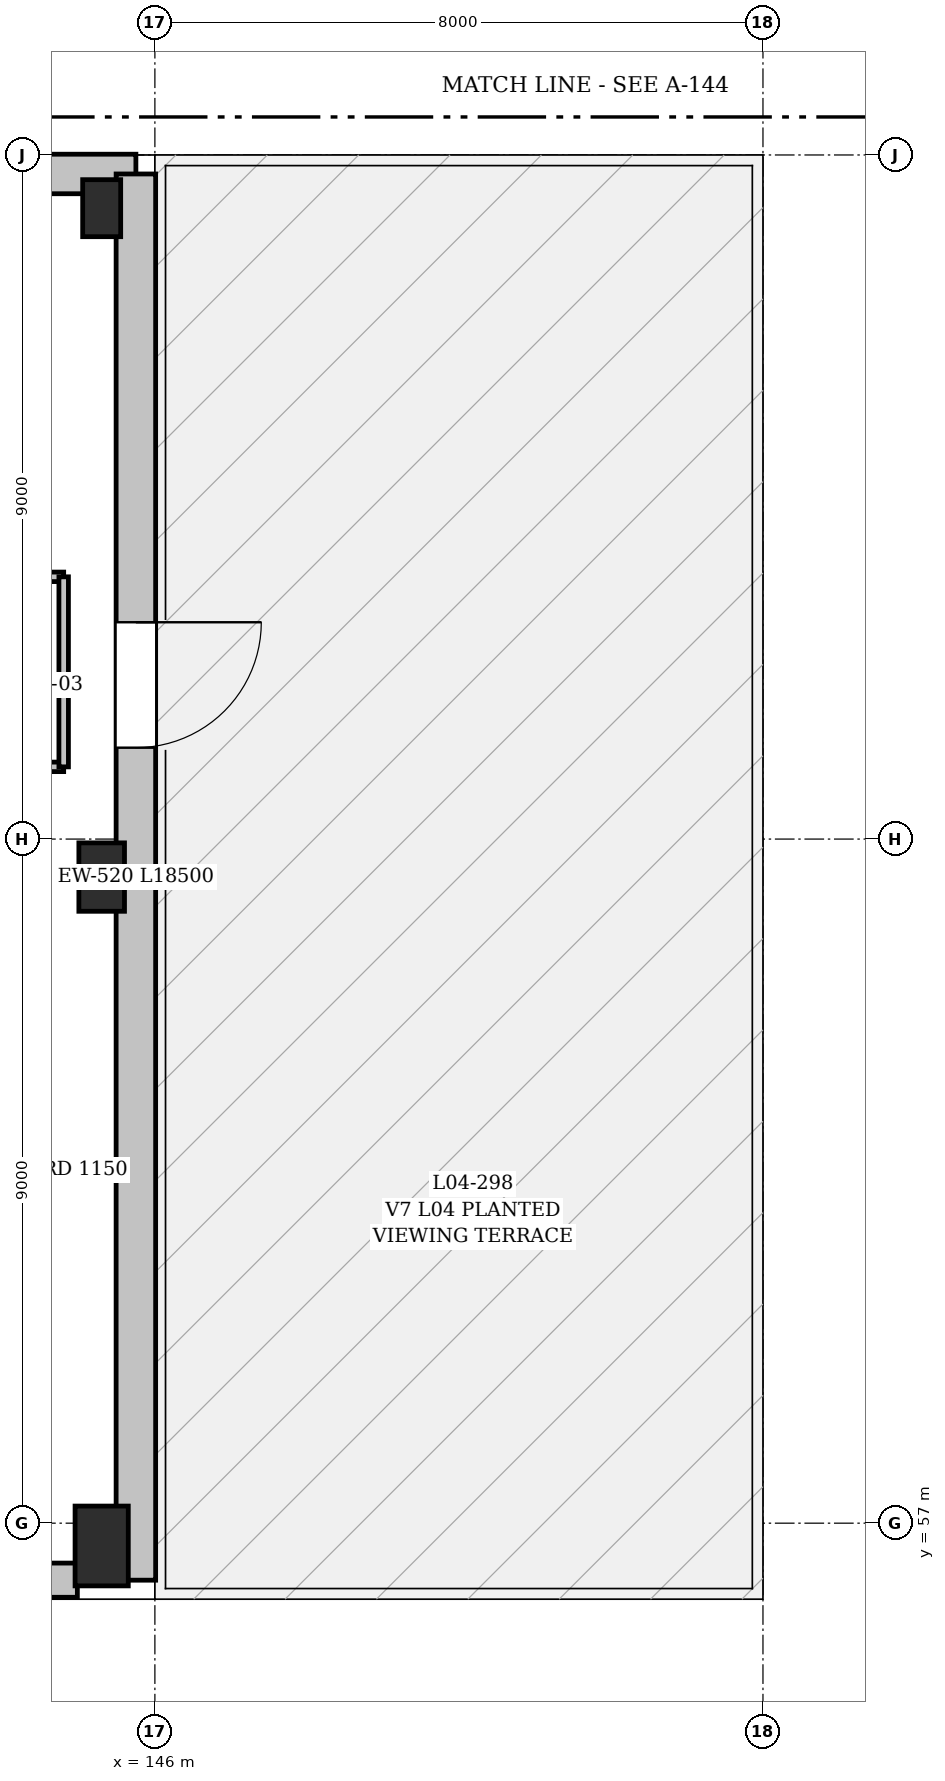
"""IFC4 building model, lengths in metres.
Left out: names, types, materials, properties, quantities, classifications, styles, units other than length and angle.
Written with IfcOpenShell. Run it as: python <this file> out.ifc"""

import sys

from ifc_helpers import new_model, si_unit, direction, frame, frame_2d, origin, origin_2d, place, context, subcontext, project, spatial, rectangle, extrude, element, fill, save


model = new_model("IFC4")
c1 = context("Model", 3, precision=1e-05, world=origin(), true_north=direction((0.0, 1.0)))
c2 = subcontext(c1, "Body", "Model", "MODEL_VIEW")
j1 = project(units=[si_unit("LENGTHUNIT", "METRE"), si_unit("PLANEANGLEUNIT", "RADIAN")], contexts=[c1])
p1 = place(None, origin())
s1 = spatial("IfcSite", under=j1, at=p1, CompositionType="ELEMENT")
p2 = place(p1, origin())
s2 = spatial("IfcBuilding", under=s1, at=p2, CompositionType="ELEMENT")
p3 = place(p2, frame((0.0, 0.0, 15.0)))
s3 = spatial("IfcBuildingStorey", under=s2, at=p3, CompositionType="ELEMENT", Elevation=15.0)
p4 = place(p3, frame((145.3, 56.7, 0.0), z_axis=(0.0, 0.0, 1.0), x_axis=(1.0, 0.0, 0.0)))
e1 = element("IfcColumn", 1, at=p4, inside=s3, PredefinedType="COLUMN", context=c2, shape_type="SweptSolid", body=[
    extrude(rectangle(XDim=0.7, YDim=1.05, at=origin_2d()), origin(), (0.0, 0.0, 1.0), 4.54),
])
p5 = place(p3, frame((145.3, 65.5, 0.0), z_axis=(0.0, 0.0, 1.0), x_axis=(1.0, 0.0, 0.0)))
e2 = element("IfcColumn", 2, at=p5, inside=s3, PredefinedType="COLUMN", context=c2, shape_type="SweptSolid", body=[
    extrude(rectangle(XDim=0.6, YDim=0.9, at=origin_2d()), origin(), (0.0, 0.0, 1.0), 4.54),
])
p6 = place(p3, frame((145.3, 74.3, 0.0), z_axis=(0.0, 0.0, 1.0), x_axis=(1.0, 0.0, 0.0)))
e3 = element("IfcColumn", 3, at=p6, inside=s3, PredefinedType="COLUMN", context=c2, shape_type="SweptSolid", body=[
    extrude(rectangle(XDim=0.5, YDim=0.75, at=origin_2d()), origin(), (0.0, 0.0, 1.0), 4.54),
])
p7 = place(p3, frame((138.37, 74.75, 0.0), z_axis=(0.0, 0.0, 1.0), x_axis=(1.0, 0.0, 0.0)))
e4 = element("IfcWall", 4, at=p7, inside=s3, PredefinedType="SOLIDWALL", context=c2, shape_type="SweptSolid", body=[
    extrude(rectangle(XDim=7.38, YDim=0.52, at=frame_2d((3.69, 0.0))), origin(), (0.0, 0.0, 1.0), 4.54),
])
p8 = place(p3, frame((145.75, 74.75, 0.0), z_axis=(0.0, 0.0, 1.0), x_axis=(0.0, -1.0, 0.0)))
e5 = element("IfcWall", 5, at=p8, inside=s3, PredefinedType="SOLIDWALL", context=c2, shape_type="SweptSolid", body=[
    extrude(rectangle(XDim=18.5, YDim=0.52, at=frame_2d((9.25, 0.0))), origin(), (0.0, 0.0, 1.0), 4.54),
])
p9 = place(p8, frame((5.897, 0.0, 0.0)))
e6 = element("IfcOpeningElement", 6, at=p9, cuts=e5, PredefinedType="OPENING", context=c2, shape_type="SweptSolid", body=[
    extrude(rectangle(XDim=1.65, YDim=2.4, at=frame_2d((0.825, 1.2))), frame((0.0, 0.27, 0.0), z_axis=(0.0, -1.0, 0.0), x_axis=(1.0, 0.0, 0.0)), (0.0, 0.0, 1.0), 0.54),
])
p10 = place(p3, frame((144.98, 56.25, 0.0), z_axis=(0.0, 0.0, 1.0), x_axis=(-1.0, 0.0, 0.0)))
e7 = element("IfcWall", 7, at=p10, inside=s3, PredefinedType="SOLIDWALL", context=c2, shape_type="SweptSolid", body=[
    extrude(rectangle(XDim=22.73, YDim=0.45, at=frame_2d((11.365, 0.0))), origin(), (0.0, 0.0, 1.0), 4.54),
])
p11 = place(p10, frame((4.82, 0.0, 0.9)))
e8 = element("IfcOpeningElement", 8, at=p11, cuts=e7, PredefinedType="OPENING", context=c2, shape_type="SweptSolid", body=[
    extrude(rectangle(XDim=1.45, YDim=1.5, at=frame_2d((0.725, 0.75))), frame((0.0, 0.235, 0.0), z_axis=(0.0, -1.0, 0.0), x_axis=(1.0, 0.0, 0.0)), (0.0, 0.0, 1.0), 0.47),
])
p12 = place(p10, frame((8.84, 0.0, 0.9)))
e9 = element("IfcOpeningElement", 9, at=p12, cuts=e7, PredefinedType="OPENING", context=c2, shape_type="SweptSolid", body=[
    extrude(rectangle(XDim=1.45, YDim=1.5, at=frame_2d((0.725, 0.75))), frame((0.0, 0.235, 0.0), z_axis=(0.0, -1.0, 0.0), x_axis=(1.0, 0.0, 0.0)), (0.0, 0.0, 1.0), 0.47),
])
p13 = place(p10, frame((12.44, 0.0, 0.9)))
e10 = element("IfcOpeningElement", 10, at=p13, cuts=e7, PredefinedType="OPENING", context=c2, shape_type="SweptSolid", body=[
    extrude(rectangle(XDim=1.45, YDim=1.5, at=frame_2d((0.725, 0.75))), frame((0.0, 0.235, 0.0), z_axis=(0.0, -1.0, 0.0), x_axis=(1.0, 0.0, 0.0)), (0.0, 0.0, 1.0), 0.47),
])
p14 = place(p3, frame((138.2, 69.45, 0.0), z_axis=(0.0, 0.0, 1.0), x_axis=(1.0, 0.0, 0.0)))
e11 = element("IfcWall", 11, at=p14, inside=s3, PredefinedType="PARTITIONING", context=c2, shape_type="SweptSolid", body=[
    extrude(rectangle(XDim=6.6, YDim=0.125, at=frame_2d((3.3, 0.0))), origin(), (0.0, 0.0, 1.0), 3.55),
])
p15 = place(p14, frame((0.6, 0.0, 0.0)))
e12 = element("IfcOpeningElement", 12, at=p15, cuts=e11, PredefinedType="OPENING", context=c2, shape_type="SweptSolid", body=[
    extrude(rectangle(XDim=1.0, YDim=2.2, at=frame_2d((0.5, 1.1))), frame((0.0, 0.073, 0.0), z_axis=(0.0, -1.0, 0.0), x_axis=(1.0, 0.0, 0.0)), (0.0, 0.0, 1.0), 0.145),
])
p16 = place(p14, frame((2.825, 0.0, 0.0)))
e13 = element("IfcOpeningElement", 13, at=p16, cuts=e11, PredefinedType="OPENING", context=c2, shape_type="SweptSolid", body=[
    extrude(rectangle(XDim=0.95, YDim=2.2, at=frame_2d((0.475, 1.1))), frame((0.0, 0.073, 0.0), z_axis=(0.0, -1.0, 0.0), x_axis=(1.0, 0.0, 0.0)), (0.0, 0.0, 1.0), 0.145),
])
p17 = place(p14, frame((5.025, 0.0, 0.0)))
e14 = element("IfcOpeningElement", 14, at=p17, cuts=e11, PredefinedType="OPENING", context=c2, shape_type="SweptSolid", body=[
    extrude(rectangle(XDim=0.95, YDim=2.2, at=frame_2d((0.475, 1.1))), frame((0.0, 0.073, 0.0), z_axis=(0.0, -1.0, 0.0), x_axis=(1.0, 0.0, 0.0)), (0.0, 0.0, 1.0), 0.145),
])
p18 = place(p3, frame((138.2, 66.95, 0.0), z_axis=(0.0, 0.0, 1.0), x_axis=(1.0, 0.0, 0.0)))
e15 = element("IfcWall", 15, at=p18, inside=s3, PredefinedType="PARTITIONING", context=c2, shape_type="SweptSolid", body=[
    extrude(rectangle(XDim=6.6, YDim=0.125, at=frame_2d((3.3, 0.0))), origin(), (0.0, 0.0, 1.0), 3.55),
])
p19 = place(p3, frame((144.8, 66.95, 0.0), z_axis=(0.0, 0.0, 1.0), x_axis=(0.0, 1.0, 0.0)))
e16 = element("IfcWall", 16, at=p19, inside=s3, PredefinedType="PARTITIONING", context=c2, shape_type="SweptSolid", body=[
    extrude(rectangle(XDim=2.5, YDim=0.125, at=frame_2d((1.25, 0.0))), origin(), (0.0, 0.0, 1.0), 3.55),
])
p20 = place(p9, origin())
e17 = element("IfcDoor", 17, at=p20, inside=s3, OperationType="DOUBLE_DOOR_SINGLE_SWING", PredefinedType="DOOR", context=c2, shape_type="SweptSolid", body=[
    extrude(rectangle(XDim=1.65, YDim=2.4, at=frame_2d((0.825, 1.2))), frame((0.0, 0.025, 0.0), z_axis=(0.0, -1.0, 0.0), x_axis=(1.0, 0.0, 0.0)), (0.0, 0.0, 1.0), 0.05),
])
fill(e6, e17)
save(model, sys.argv[1])
